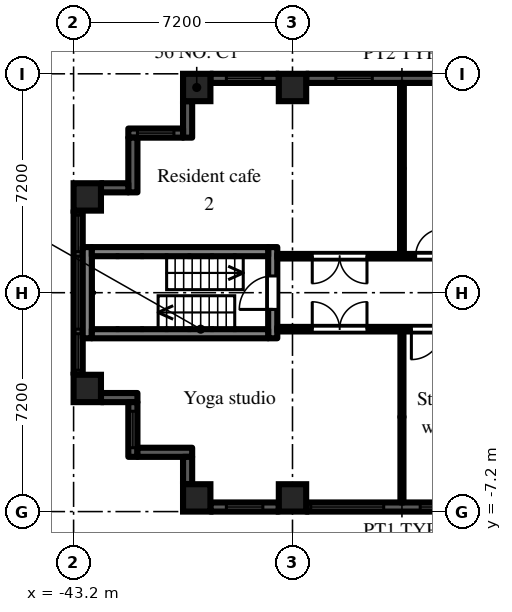
"""IFC4 building model, lengths in metres.
Left out: names, types, materials, properties, quantities, classifications, styles, units other than length and angle.
Written with IfcOpenShell. Run it as: python <this file> out.ifc"""

import sys

from ifc_helpers import new_model, si_unit, direction, frame, frame_2d, origin, origin_2d, place, context, subcontext, project, spatial, rectangle, extrude, element, fill, save


model = new_model("IFC4")
c1 = context("Model", 3, precision=1e-05, world=origin(), true_north=direction((0.0, 1.0)))
c2 = subcontext(c1, "Body", "Model", "MODEL_VIEW")
j1 = project(units=[si_unit("LENGTHUNIT", "METRE"), si_unit("PLANEANGLEUNIT", "RADIAN")], contexts=[c1])
p1 = place(None, origin())
s1 = spatial("IfcSite", under=j1, at=p1, CompositionType="ELEMENT")
p2 = place(p1, origin())
s2 = spatial("IfcBuilding", under=s1, at=p2, CompositionType="ELEMENT")
p3 = place(p2, frame((0.0, 0.0, 44.7)))
s3 = spatial("IfcBuildingStorey", under=s2, at=p3, CompositionType="ELEMENT", Elevation=44.7)
for number, where, z_axis, x_axis in (
    (1, (-42.75, -3.15, 0.0), (0.0, 0.0, 1.0), (1.0, 0.0, 0.0)),
    (2, (-42.75, 3.15, 0.0), (0.0, 0.0, 1.0), (1.0, 0.0, 0.0)),
    (3, (-39.15, -6.75, 0.0), (0.0, 0.0, 1.0), (1.0, 0.0, 0.0)),
    (4, (-39.15, 6.75, 0.0), (0.0, 0.0, 1.0), (1.0, 0.0, 0.0)),
    (5, (-36.0, -6.75, 0.0), (0.0, 0.0, 1.0), (1.0, 0.0, 0.0)),
    (6, (-36.0, 6.75, 0.0), (0.0, 0.0, 1.0), (1.0, 0.0, 0.0)),
):
    element("IfcColumn", number, at=place(p3, frame(where, z_axis=z_axis, x_axis=x_axis)), inside=s3, PredefinedType="COLUMN", context=c2, shape_type="SweptSolid", body=[
        extrude(rectangle(XDim=0.9, YDim=0.9, at=origin_2d()), origin(), (0.0, 0.0, 1.0), 3.0),
    ])
p4 = place(p3, frame((-29.25, 7.05, 0.0), z_axis=(0.0, 0.0, 1.0), x_axis=(-1.0, 0.0, 0.0)))
e7 = element("IfcWall", 7, at=p4, inside=s3, PredefinedType="SOLIDWALL", context=c2, shape_type="SweptSolid", body=[
    extrude(rectangle(XDim=6.3, YDim=0.3, at=frame_2d((3.15, 0.0))), origin(), (0.0, 0.0, 1.0), 2.1),
])
p5 = place(p4, frame((4.125, 0.0, 0.2)))
e8 = element("IfcOpeningElement", 8, at=p5, cuts=e7, PredefinedType="OPENING", context=c2, shape_type="SweptSolid", body=[
    extrude(rectangle(XDim=1.2, YDim=1.85, at=frame_2d((0.6, 0.925))), frame((0.0, 0.16, 0.0), z_axis=(0.0, -1.0, 0.0), x_axis=(1.0, 0.0, 0.0)), (0.0, 0.0, 1.0), 0.32),
])
p6 = place(p3, frame((-36.45, 7.05, 0.0), z_axis=(0.0, 0.0, 1.0), x_axis=(-1.0, 0.0, 0.0)))
e9 = element("IfcWall", 9, at=p6, inside=s3, PredefinedType="SOLIDWALL", context=c2, shape_type="SweptSolid", body=[
    extrude(rectangle(XDim=2.25, YDim=0.3, at=frame_2d((1.125, 0.0))), origin(), (0.0, 0.0, 1.0), 2.1),
])
p7 = place(p6, frame((0.525, 0.0, 0.2)))
e10 = element("IfcOpeningElement", 10, at=p7, cuts=e9, PredefinedType="OPENING", context=c2, shape_type="SweptSolid", body=[
    extrude(rectangle(XDim=1.2, YDim=1.85, at=frame_2d((0.6, 0.925))), frame((0.0, 0.16, 0.0), z_axis=(0.0, -1.0, 0.0), x_axis=(1.0, 0.0, 0.0)), (0.0, 0.0, 1.0), 0.32),
])
p8 = place(p3, frame((-39.45, 6.3, 0.0), z_axis=(0.0, 0.0, 1.0), x_axis=(0.0, -1.0, 0.0)))
e11 = element("IfcWall", 11, at=p8, inside=s3, PredefinedType="SOLIDWALL", context=c2, shape_type="SweptSolid", body=[
    extrude(rectangle(XDim=1.2, YDim=0.3, at=frame_2d((0.6, 0.0))), origin(), (0.0, 0.0, 1.0), 2.575),
])
p9 = place(p3, frame((-39.6, 5.25, 0.0), z_axis=(0.0, 0.0, 1.0), x_axis=(-1.0, 0.0, 0.0)))
e12 = element("IfcWall", 12, at=p9, inside=s3, PredefinedType="SOLIDWALL", context=c2, shape_type="SweptSolid", body=[
    extrude(rectangle(XDim=1.8, YDim=0.3, at=frame_2d((0.9, 0.0))), origin(), (0.0, 0.0, 1.0), 2.575),
])
p10 = place(p9, frame((0.3, 0.0, 0.2)))
e13 = element("IfcOpeningElement", 13, at=p10, cuts=e12, PredefinedType="OPENING", context=c2, shape_type="SweptSolid", body=[
    extrude(rectangle(XDim=1.2, YDim=1.85, at=frame_2d((0.6, 0.925))), frame((0.0, 0.16, 0.0), z_axis=(0.0, -1.0, 0.0), x_axis=(1.0, 0.0, 0.0)), (0.0, 0.0, 1.0), 0.32),
])
p11 = place(p3, frame((-41.25, 5.1, 0.0), z_axis=(0.0, 0.0, 1.0), x_axis=(0.0, -1.0, 0.0)))
e14 = element("IfcWall", 14, at=p11, inside=s3, PredefinedType="SOLIDWALL", context=c2, shape_type="SweptSolid", body=[
    extrude(rectangle(XDim=1.8, YDim=0.3, at=frame_2d((0.9, 0.0))), origin(), (0.0, 0.0, 1.0), 2.575),
])
p12 = place(p3, frame((-41.4, 3.45, 0.0), z_axis=(0.0, 0.0, 1.0), x_axis=(-1.0, 0.0, 0.0)))
e15 = element("IfcWall", 15, at=p12, inside=s3, PredefinedType="SOLIDWALL", context=c2, shape_type="SweptSolid", body=[
    extrude(rectangle(XDim=0.9, YDim=0.3, at=frame_2d((0.45, 0.0))), origin(), (0.0, 0.0, 1.0), 2.575),
])
p13 = place(p3, frame((-43.05, 2.7, 0.0), z_axis=(0.0, 0.0, 1.0), x_axis=(0.0, -1.0, 0.0)))
e16 = element("IfcWall", 16, at=p13, inside=s3, PredefinedType="SOLIDWALL", context=c2, shape_type="SweptSolid", body=[
    extrude(rectangle(XDim=5.4, YDim=0.3, at=frame_2d((2.7, 0.0))), origin(), (0.0, 0.0, 1.0), 2.1),
])
p14 = place(p13, frame((1.5, 0.0, 0.2)))
e17 = element("IfcOpeningElement", 17, at=p14, cuts=e16, PredefinedType="OPENING", context=c2, shape_type="SweptSolid", body=[
    extrude(rectangle(XDim=2.4, YDim=1.85, at=frame_2d((1.2, 0.925))), frame((0.0, 0.16, 0.0), z_axis=(0.0, -1.0, 0.0), x_axis=(1.0, 0.0, 0.0)), (0.0, 0.0, 1.0), 0.32),
])
p15 = place(p13, frame((0.15, 0.0, 0.2)))
e18 = element("IfcOpeningElement", 18, at=p15, cuts=e16, PredefinedType="OPENING", context=c2, shape_type="SweptSolid", body=[
    extrude(rectangle(XDim=1.2, YDim=1.85, at=frame_2d((0.6, 0.925))), frame((0.0, 0.16, 0.0), z_axis=(0.0, -1.0, 0.0), x_axis=(1.0, 0.0, 0.0)), (0.0, 0.0, 1.0), 0.32),
])
p16 = place(p13, frame((4.05, 0.0, 0.2)))
e19 = element("IfcOpeningElement", 19, at=p16, cuts=e16, PredefinedType="OPENING", context=c2, shape_type="SweptSolid", body=[
    extrude(rectangle(XDim=1.2, YDim=1.85, at=frame_2d((0.6, 0.925))), frame((0.0, 0.16, 0.0), z_axis=(0.0, -1.0, 0.0), x_axis=(1.0, 0.0, 0.0)), (0.0, 0.0, 1.0), 0.32),
])
p17 = place(p3, frame((-42.3, -3.45, 0.0), z_axis=(0.0, 0.0, 1.0), x_axis=(1.0, 0.0, 0.0)))
e20 = element("IfcWall", 20, at=p17, inside=s3, PredefinedType="SOLIDWALL", context=c2, shape_type="SweptSolid", body=[
    extrude(rectangle(XDim=1.2, YDim=0.3, at=frame_2d((0.6, 0.0))), origin(), (0.0, 0.0, 1.0), 2.575),
])
p18 = place(p3, frame((-41.25, -3.6, 0.0), z_axis=(0.0, 0.0, 1.0), x_axis=(0.0, -1.0, 0.0)))
e21 = element("IfcWall", 21, at=p18, inside=s3, PredefinedType="SOLIDWALL", context=c2, shape_type="SweptSolid", body=[
    extrude(rectangle(XDim=1.8, YDim=0.3, at=frame_2d((0.9, 0.0))), origin(), (0.0, 0.0, 1.0), 2.575),
])
p19 = place(p18, frame((0.3, 0.0, 0.2)))
e22 = element("IfcOpeningElement", 22, at=p19, cuts=e21, PredefinedType="OPENING", context=c2, shape_type="SweptSolid", body=[
    extrude(rectangle(XDim=1.2, YDim=1.85, at=frame_2d((0.6, 0.925))), frame((0.0, 0.16, 0.0), z_axis=(0.0, -1.0, 0.0), x_axis=(1.0, 0.0, 0.0)), (0.0, 0.0, 1.0), 0.32),
])
p20 = place(p3, frame((-41.1, -5.25, 0.0), z_axis=(0.0, 0.0, 1.0), x_axis=(1.0, 0.0, 0.0)))
e23 = element("IfcWall", 23, at=p20, inside=s3, PredefinedType="SOLIDWALL", context=c2, shape_type="SweptSolid", body=[
    extrude(rectangle(XDim=1.8, YDim=0.3, at=frame_2d((0.9, 0.0))), origin(), (0.0, 0.0, 1.0), 2.575),
])
p21 = place(p3, frame((-39.45, -5.4, 0.0), z_axis=(0.0, 0.0, 1.0), x_axis=(0.0, -1.0, 0.0)))
e24 = element("IfcWall", 24, at=p21, inside=s3, PredefinedType="SOLIDWALL", context=c2, shape_type="SweptSolid", body=[
    extrude(rectangle(XDim=0.9, YDim=0.3, at=frame_2d((0.45, 0.0))), origin(), (0.0, 0.0, 1.0), 2.575),
])
p22 = place(p3, frame((-38.7, -7.05, 0.0), z_axis=(0.0, 0.0, 1.0), x_axis=(1.0, 0.0, 0.0)))
e25 = element("IfcWall", 25, at=p22, inside=s3, PredefinedType="SOLIDWALL", context=c2, shape_type="SweptSolid", body=[
    extrude(rectangle(XDim=2.25, YDim=0.3, at=frame_2d((1.125, 0.0))), origin(), (0.0, 0.0, 1.0), 2.1),
])
p23 = place(p22, frame((0.525, 0.0, 0.2)))
e26 = element("IfcOpeningElement", 26, at=p23, cuts=e25, PredefinedType="OPENING", context=c2, shape_type="SweptSolid", body=[
    extrude(rectangle(XDim=1.2, YDim=1.85, at=frame_2d((0.6, 0.925))), frame((0.0, 0.16, 0.0), z_axis=(0.0, -1.0, 0.0), x_axis=(1.0, 0.0, 0.0)), (0.0, 0.0, 1.0), 0.32),
])
p24 = place(p3, frame((-35.55, -7.05, 0.0), z_axis=(0.0, 0.0, 1.0), x_axis=(1.0, 0.0, 0.0)))
e27 = element("IfcWall", 27, at=p24, inside=s3, PredefinedType="SOLIDWALL", context=c2, shape_type="SweptSolid", body=[
    extrude(rectangle(XDim=6.3, YDim=0.3, at=frame_2d((3.15, 0.0))), origin(), (0.0, 0.0, 1.0), 2.1),
])
p25 = place(p24, frame((0.15, 0.0, 0.2)))
e28 = element("IfcOpeningElement", 28, at=p25, cuts=e27, PredefinedType="OPENING", context=c2, shape_type="SweptSolid", body=[
    extrude(rectangle(XDim=2.4, YDim=1.85, at=frame_2d((1.2, 0.925))), frame((0.0, 0.16, 0.0), z_axis=(0.0, -1.0, 0.0), x_axis=(1.0, 0.0, 0.0)), (0.0, 0.0, 1.0), 0.32),
])
p26 = place(p24, frame((3.75, 0.0, 0.2)))
e29 = element("IfcOpeningElement", 29, at=p26, cuts=e27, PredefinedType="OPENING", context=c2, shape_type="SweptSolid", body=[
    extrude(rectangle(XDim=2.4, YDim=1.85, at=frame_2d((1.2, 0.925))), frame((0.0, 0.16, 0.0), z_axis=(0.0, -1.0, 0.0), x_axis=(1.0, 0.0, 0.0)), (0.0, 0.0, 1.0), 0.32),
])
p27 = place(p3, frame((-36.65, -1.5, 0.0), z_axis=(0.0, 0.0, 1.0), x_axis=(0.0, 1.0, 0.0)))
e30 = element("IfcWall", 30, at=p27, inside=s3, PredefinedType="SHEAR", context=c2, shape_type="SweptSolid", body=[
    extrude(rectangle(XDim=3.0, YDim=0.3, at=frame_2d((1.5, 0.0))), origin(), (0.0, 0.0, 1.0), 2.575),
])
p28 = place(p27, frame((0.95, 0.0, 0.0)))
e31 = element("IfcOpeningElement", 31, at=p28, cuts=e30, PredefinedType="OPENING", context=c2, shape_type="SweptSolid", body=[
    extrude(rectangle(XDim=1.1, YDim=2.1, at=frame_2d((0.55, 1.05))), frame((0.0, 0.16, 0.0), z_axis=(0.0, -1.0, 0.0), x_axis=(1.0, 0.0, 0.0)), (0.0, 0.0, 1.0), 0.32),
])
p29 = place(p3, frame((-42.75, -1.5, 0.0), z_axis=(0.0, 0.0, 1.0), x_axis=(0.0, 1.0, 0.0)))
e32 = element("IfcWall", 32, at=p29, inside=s3, PredefinedType="SHEAR", context=c2, shape_type="SweptSolid", body=[
    extrude(rectangle(XDim=3.0, YDim=0.3, at=frame_2d((1.5, 0.0))), origin(), (0.0, 0.0, 1.0), 2.575),
])
for number, where, z_axis, x_axis in (
    (33, (-36.8, -1.35, 0.0), (0.0, 0.0, 1.0), (-1.0, 0.0, 0.0)),
    (34, (-36.8, 1.35, 0.0), (0.0, 0.0, 1.0), (-1.0, 0.0, 0.0)),
):
    element("IfcWall", number, at=place(p3, frame(where, z_axis=z_axis, x_axis=x_axis)), inside=s3, PredefinedType="SHEAR", context=c2, shape_type="SweptSolid", body=[
        extrude(rectangle(XDim=5.8, YDim=0.3, at=frame_2d((2.9, 0.0))), origin(), (0.0, 0.0, 1.0), 2.575),
    ])
p30 = place(p3, frame((-36.5, -1.2, 0.0), z_axis=(0.0, 0.0, 1.0), x_axis=(1.0, 0.0, 0.0)))
e35 = element("IfcWall", 35, at=p30, inside=s3, PredefinedType="PARTITIONING", context=c2, shape_type="SweptSolid", body=[
    extrude(rectangle(XDim=14.9, YDim=0.15, at=frame_2d((7.45, 0.0))), origin(), (0.0, 0.0, 1.0), 2.575),
])
p31 = place(p30, frame((13.3, 0.0, 0.0)))
e36 = element("IfcOpeningElement", 36, at=p31, cuts=e35, PredefinedType="OPENING", context=c2, shape_type="SweptSolid", body=[
    extrude(rectangle(XDim=1.0, YDim=2.1, at=frame_2d((0.5, 1.05))), frame((0.0, 0.085, 0.0), z_axis=(0.0, -1.0, 0.0), x_axis=(1.0, 0.0, 0.0)), (0.0, 0.0, 1.0), 0.17),
])
p32 = place(p30, frame((4.41, 0.0, 0.0)))
e37 = element("IfcOpeningElement", 37, at=p32, cuts=e35, PredefinedType="OPENING", context=c2, shape_type="SweptSolid", body=[
    extrude(rectangle(XDim=1.0, YDim=2.1, at=frame_2d((0.5, 1.05))), frame((0.0, 0.085, 0.0), z_axis=(0.0, -1.0, 0.0), x_axis=(1.0, 0.0, 0.0)), (0.0, 0.0, 1.0), 0.17),
])
p33 = place(p30, frame((1.15, 0.0, 0.0)))
e38 = element("IfcOpeningElement", 38, at=p33, cuts=e35, PredefinedType="OPENING", context=c2, shape_type="SweptSolid", body=[
    extrude(rectangle(XDim=1.8, YDim=2.1, at=frame_2d((0.9, 1.05))), frame((0.0, 0.085, 0.0), z_axis=(0.0, -1.0, 0.0), x_axis=(1.0, 0.0, 0.0)), (0.0, 0.0, 1.0), 0.17),
])
p34 = place(p3, frame((-36.5, 1.2, 0.0), z_axis=(0.0, 0.0, 1.0), x_axis=(1.0, 0.0, 0.0)))
e39 = element("IfcWall", 39, at=p34, inside=s3, PredefinedType="PARTITIONING", context=c2, shape_type="SweptSolid", body=[
    extrude(rectangle(XDim=14.9, YDim=0.15, at=frame_2d((7.45, 0.0))), origin(), (0.0, 0.0, 1.0), 2.575),
])
p35 = place(p34, frame((13.7, 0.0, 0.0)))
e40 = element("IfcOpeningElement", 40, at=p35, cuts=e39, PredefinedType="OPENING", context=c2, shape_type="SweptSolid", body=[
    extrude(rectangle(XDim=1.0, YDim=2.1, at=frame_2d((0.5, 1.05))), frame((0.0, 0.085, 0.0), z_axis=(0.0, -1.0, 0.0), x_axis=(1.0, 0.0, 0.0)), (0.0, 0.0, 1.0), 0.17),
])
p36 = place(p34, frame((8.3, 0.0, 0.0)))
e41 = element("IfcOpeningElement", 41, at=p36, cuts=e39, PredefinedType="OPENING", context=c2, shape_type="SweptSolid", body=[
    extrude(rectangle(XDim=1.0, YDim=2.1, at=frame_2d((0.5, 1.05))), frame((0.0, 0.085, 0.0), z_axis=(0.0, -1.0, 0.0), x_axis=(1.0, 0.0, 0.0)), (0.0, 0.0, 1.0), 0.17),
])
p37 = place(p34, frame((6.35, 0.0, 0.0)))
e42 = element("IfcOpeningElement", 42, at=p37, cuts=e39, PredefinedType="OPENING", context=c2, shape_type="SweptSolid", body=[
    extrude(rectangle(XDim=0.9, YDim=2.1, at=frame_2d((0.45, 1.05))), frame((0.0, 0.085, 0.0), z_axis=(0.0, -1.0, 0.0), x_axis=(1.0, 0.0, 0.0)), (0.0, 0.0, 1.0), 0.17),
])
p38 = place(p34, frame((4.55, 0.0, 0.0)))
e43 = element("IfcOpeningElement", 43, at=p38, cuts=e39, PredefinedType="OPENING", context=c2, shape_type="SweptSolid", body=[
    extrude(rectangle(XDim=0.9, YDim=2.1, at=frame_2d((0.45, 1.05))), frame((0.0, 0.085, 0.0), z_axis=(0.0, -1.0, 0.0), x_axis=(1.0, 0.0, 0.0)), (0.0, 0.0, 1.0), 0.17),
])
p39 = place(p34, frame((1.15, 0.0, 0.0)))
e44 = element("IfcOpeningElement", 44, at=p39, cuts=e39, PredefinedType="OPENING", context=c2, shape_type="SweptSolid", body=[
    extrude(rectangle(XDim=1.8, YDim=2.1, at=frame_2d((0.9, 1.05))), frame((0.0, 0.085, 0.0), z_axis=(0.0, -1.0, 0.0), x_axis=(1.0, 0.0, 0.0)), (0.0, 0.0, 1.0), 0.17),
])
p40 = place(p3, frame((-32.4, -6.9, 0.0), z_axis=(0.0, 0.0, 1.0), x_axis=(0.0, 1.0, 0.0)))
e45 = element("IfcWall", 45, at=p40, inside=s3, PredefinedType="PARTITIONING", context=c2, shape_type="SweptSolid", body=[
    extrude(rectangle(XDim=5.625, YDim=0.1, at=frame_2d((2.812, 0.0))), origin(), (0.0, 0.0, 1.0), 2.575),
])
p41 = place(p3, frame((-32.4, 1.275, 0.0), z_axis=(0.0, 0.0, 1.0), x_axis=(0.0, 1.0, 0.0)))
e46 = element("IfcWall", 46, at=p41, inside=s3, PredefinedType="PARTITIONING", context=c2, shape_type="SweptSolid", body=[
    extrude(rectangle(XDim=5.625, YDim=0.125, at=frame_2d((2.812, 0.0))), origin(), (0.0, 0.0, 1.0), 2.575),
])
p42 = place(p5, origin())
e47 = element("IfcWindow", 47, at=p42, inside=s3, PartitioningType="SINGLE_PANEL", PredefinedType="WINDOW", context=c2, shape_type="SweptSolid", body=[
    extrude(rectangle(XDim=1.2, YDim=1.85, at=frame_2d((0.6, 0.925))), frame((0.0, 0.03, 0.0), z_axis=(0.0, -1.0, 0.0), x_axis=(1.0, 0.0, 0.0)), (0.0, 0.0, 1.0), 0.06),
])
fill(e8, e47)
p43 = place(p7, origin())
e48 = element("IfcWindow", 48, at=p43, inside=s3, PartitioningType="SINGLE_PANEL", PredefinedType="WINDOW", context=c2, shape_type="SweptSolid", body=[
    extrude(rectangle(XDim=1.2, YDim=1.85, at=frame_2d((0.6, 0.925))), frame((0.0, 0.03, 0.0), z_axis=(0.0, -1.0, 0.0), x_axis=(1.0, 0.0, 0.0)), (0.0, 0.0, 1.0), 0.06),
])
fill(e10, e48)
p44 = place(p10, origin())
e49 = element("IfcWindow", 49, at=p44, inside=s3, PartitioningType="SINGLE_PANEL", PredefinedType="WINDOW", context=c2, shape_type="SweptSolid", body=[
    extrude(rectangle(XDim=1.2, YDim=1.85, at=frame_2d((0.6, 0.925))), frame((0.0, 0.03, 0.0), z_axis=(0.0, -1.0, 0.0), x_axis=(1.0, 0.0, 0.0)), (0.0, 0.0, 1.0), 0.06),
])
fill(e13, e49)
p45 = place(p14, origin())
e50 = element("IfcWindow", 50, at=p45, inside=s3, PartitioningType="SINGLE_PANEL", PredefinedType="WINDOW", context=c2, shape_type="SweptSolid", body=[
    extrude(rectangle(XDim=2.4, YDim=1.85, at=frame_2d((1.2, 0.925))), frame((0.0, 0.03, 0.0), z_axis=(0.0, -1.0, 0.0), x_axis=(1.0, 0.0, 0.0)), (0.0, 0.0, 1.0), 0.06),
])
fill(e17, e50)
p46 = place(p15, origin())
e51 = element("IfcWindow", 51, at=p46, inside=s3, PartitioningType="SINGLE_PANEL", PredefinedType="WINDOW", context=c2, shape_type="SweptSolid", body=[
    extrude(rectangle(XDim=1.2, YDim=1.85, at=frame_2d((0.6, 0.925))), frame((0.0, 0.03, 0.0), z_axis=(0.0, -1.0, 0.0), x_axis=(1.0, 0.0, 0.0)), (0.0, 0.0, 1.0), 0.06),
])
fill(e18, e51)
p47 = place(p16, origin())
e52 = element("IfcWindow", 52, at=p47, inside=s3, PartitioningType="SINGLE_PANEL", PredefinedType="WINDOW", context=c2, shape_type="SweptSolid", body=[
    extrude(rectangle(XDim=1.2, YDim=1.85, at=frame_2d((0.6, 0.925))), frame((0.0, 0.03, 0.0), z_axis=(0.0, -1.0, 0.0), x_axis=(1.0, 0.0, 0.0)), (0.0, 0.0, 1.0), 0.06),
])
fill(e19, e52)
p48 = place(p19, origin())
e53 = element("IfcWindow", 53, at=p48, inside=s3, PartitioningType="SINGLE_PANEL", PredefinedType="WINDOW", context=c2, shape_type="SweptSolid", body=[
    extrude(rectangle(XDim=1.2, YDim=1.85, at=frame_2d((0.6, 0.925))), frame((0.0, 0.03, 0.0), z_axis=(0.0, -1.0, 0.0), x_axis=(1.0, 0.0, 0.0)), (0.0, 0.0, 1.0), 0.06),
])
fill(e22, e53)
p49 = place(p23, origin())
e54 = element("IfcWindow", 54, at=p49, inside=s3, PartitioningType="SINGLE_PANEL", PredefinedType="WINDOW", context=c2, shape_type="SweptSolid", body=[
    extrude(rectangle(XDim=1.2, YDim=1.85, at=frame_2d((0.6, 0.925))), frame((0.0, 0.03, 0.0), z_axis=(0.0, -1.0, 0.0), x_axis=(1.0, 0.0, 0.0)), (0.0, 0.0, 1.0), 0.06),
])
fill(e26, e54)
p50 = place(p25, origin())
e55 = element("IfcWindow", 55, at=p50, inside=s3, PartitioningType="SINGLE_PANEL", PredefinedType="WINDOW", context=c2, shape_type="SweptSolid", body=[
    extrude(rectangle(XDim=2.4, YDim=1.85, at=frame_2d((1.2, 0.925))), frame((0.0, 0.03, 0.0), z_axis=(0.0, -1.0, 0.0), x_axis=(1.0, 0.0, 0.0)), (0.0, 0.0, 1.0), 0.06),
])
fill(e28, e55)
p51 = place(p26, origin())
e56 = element("IfcWindow", 56, at=p51, inside=s3, PartitioningType="SINGLE_PANEL", PredefinedType="WINDOW", context=c2, shape_type="SweptSolid", body=[
    extrude(rectangle(XDim=2.4, YDim=1.85, at=frame_2d((1.2, 0.925))), frame((0.0, 0.03, 0.0), z_axis=(0.0, -1.0, 0.0), x_axis=(1.0, 0.0, 0.0)), (0.0, 0.0, 1.0), 0.06),
])
fill(e29, e56)
p52 = place(p28, origin())
e57 = element("IfcDoor", 57, at=p52, inside=s3, OperationType="SINGLE_SWING_LEFT", PredefinedType="DOOR", context=c2, shape_type="SweptSolid", body=[
    extrude(rectangle(XDim=1.1, YDim=2.1, at=frame_2d((0.55, 1.05))), frame((0.0, 0.025, 0.0), z_axis=(0.0, -1.0, 0.0), x_axis=(1.0, 0.0, 0.0)), (0.0, 0.0, 1.0), 0.05),
])
fill(e31, e57)
p53 = place(p32, frame((1.0, 0.0, 0.0), z_axis=(0.0, 0.0, 1.0), x_axis=(-1.0, 0.0, 0.0)))
e58 = element("IfcDoor", 58, at=p53, inside=s3, OperationType="SINGLE_SWING_RIGHT", PredefinedType="DOOR", context=c2, shape_type="SweptSolid", body=[
    extrude(rectangle(XDim=1.0, YDim=2.1, at=frame_2d((0.5, 1.05))), frame((0.0, 0.025, 0.0), z_axis=(0.0, -1.0, 0.0), x_axis=(1.0, 0.0, 0.0)), (0.0, 0.0, 1.0), 0.05),
])
fill(e37, e58)
p54 = place(p33, origin())
e59 = element("IfcDoor", 59, at=p54, inside=s3, OperationType="DOUBLE_DOOR_DOUBLE_SWING", PredefinedType="DOOR", context=c2, shape_type="SweptSolid", body=[
    extrude(rectangle(XDim=1.8, YDim=2.1, at=frame_2d((0.9, 1.05))), frame((0.0, 0.025, 0.0), z_axis=(0.0, -1.0, 0.0), x_axis=(1.0, 0.0, 0.0)), (0.0, 0.0, 1.0), 0.05),
])
fill(e38, e59)
p55 = place(p38, origin())
e60 = element("IfcDoor", 60, at=p55, inside=s3, OperationType="SINGLE_SWING_RIGHT", PredefinedType="DOOR", context=c2, shape_type="SweptSolid", body=[
    extrude(rectangle(XDim=0.9, YDim=2.1, at=frame_2d((0.45, 1.05))), frame((0.0, 0.025, 0.0), z_axis=(0.0, -1.0, 0.0), x_axis=(1.0, 0.0, 0.0)), (0.0, 0.0, 1.0), 0.05),
])
fill(e43, e60)
p56 = place(p39, frame((1.8, 0.0, 0.0), z_axis=(0.0, 0.0, 1.0), x_axis=(-1.0, 0.0, 0.0)))
e61 = element("IfcDoor", 61, at=p56, inside=s3, OperationType="DOUBLE_DOOR_DOUBLE_SWING", PredefinedType="DOOR", context=c2, shape_type="SweptSolid", body=[
    extrude(rectangle(XDim=1.8, YDim=2.1, at=frame_2d((0.9, 1.05))), frame((0.0, 0.025, 0.0), z_axis=(0.0, -1.0, 0.0), x_axis=(1.0, 0.0, 0.0)), (0.0, 0.0, 1.0), 0.05),
])
fill(e44, e61)
save(model, sys.argv[1])
